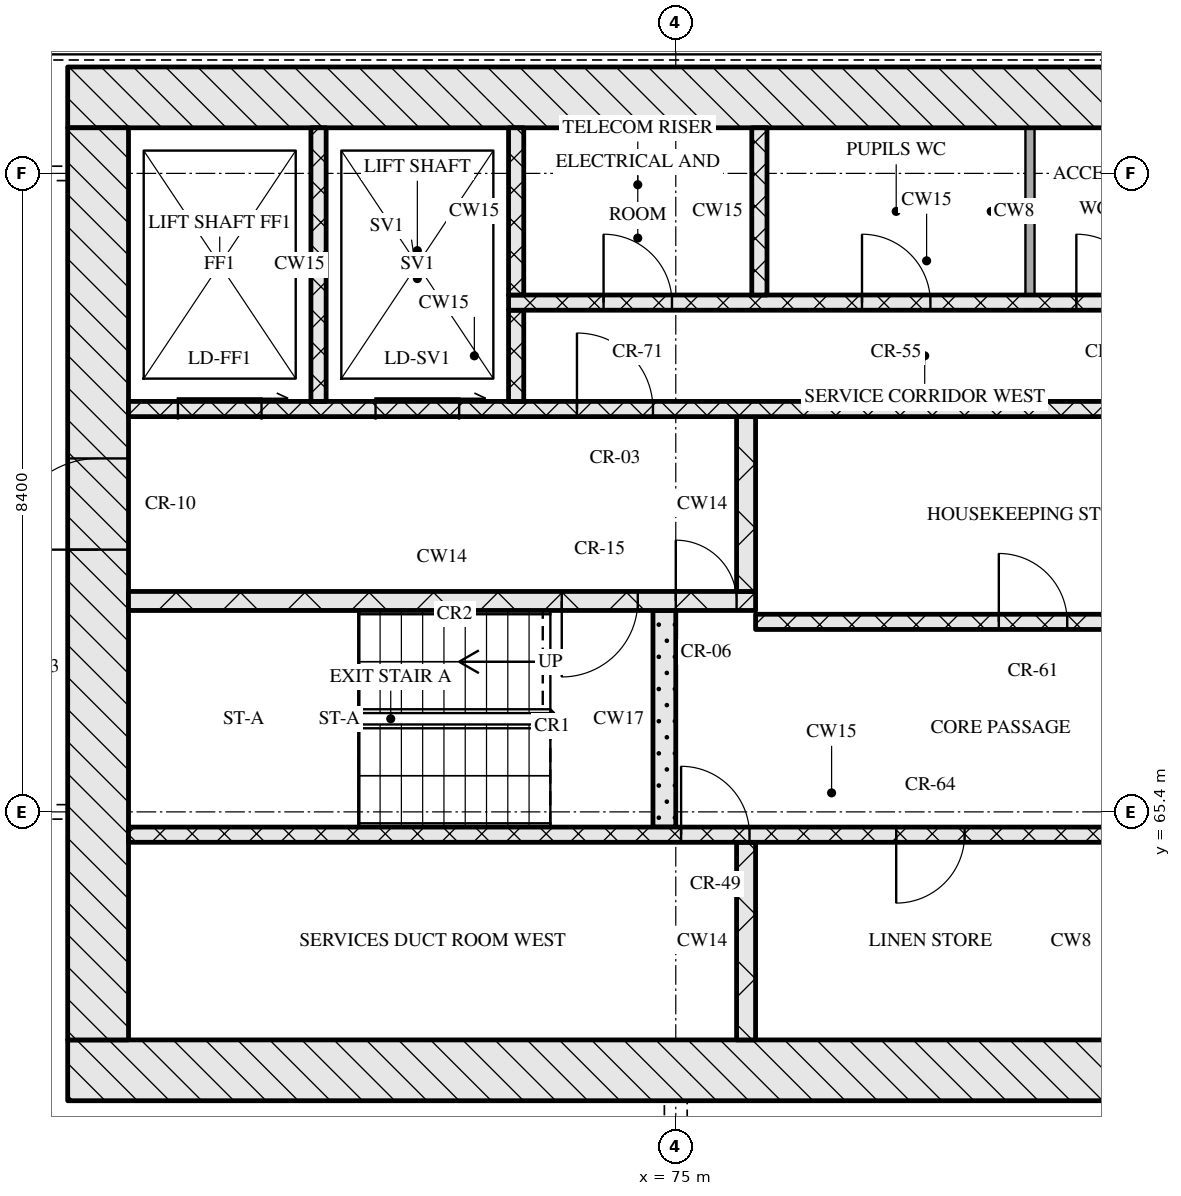
"""IFC4 building model, lengths in metres.
Left out: names, types, materials, properties, quantities, classifications, styles, units other than length and angle.
Written with IfcOpenShell. Run it as: python <this file> out.ifc"""

import sys

from ifc_helpers import new_model, si_unit, direction, frame, frame_2d, origin, place, context, subcontext, project, spatial, rectangle, extrude, element, fill, save


model = new_model("IFC4")
c1 = context("Model", 3, precision=1e-05, world=origin(), true_north=direction((0.0, 1.0)))
c2 = subcontext(c1, "Body", "Model", "MODEL_VIEW")
j1 = project(units=[si_unit("LENGTHUNIT", "METRE"), si_unit("PLANEANGLEUNIT", "RADIAN")], contexts=[c1])
p1 = place(None, origin())
s1 = spatial("IfcSite", under=j1, at=p1, CompositionType="ELEMENT")
p2 = place(p1, origin())
s2 = spatial("IfcBuilding", under=s1, at=p2, CompositionType="ELEMENT")
p3 = place(p2, frame((0.0, 0.0, 158.25)))
s3 = spatial("IfcBuildingStorey", under=s2, at=p3, CompositionType="ELEMENT", Elevation=158.25)
p4 = place(p3, frame((67.0, 62.0, 0.0), z_axis=(0.0, 0.0, 1.0), x_axis=(1.0, 0.0, 0.0)))
e1 = element("IfcWall", 1, at=p4, inside=s3, PredefinedType="SOLIDWALL", context=c2, shape_type="SweptSolid", body=[
    extrude(rectangle(XDim=41.2, YDim=0.8, at=frame_2d((20.6, 0.0))), origin(), (0.0, 0.0, 1.0), 3.32),
])
p5 = place(p4, frame((20.95, 0.0, 0.0)))
e2 = element("IfcOpeningElement", 2, at=p5, cuts=e1, PredefinedType="OPENING", context=c2, shape_type="SweptSolid", body=[
    extrude(rectangle(XDim=1.8, YDim=2.1, at=frame_2d((0.9, 1.05))), frame((0.0, 0.41, 0.0), z_axis=(0.0, -1.0, 0.0), x_axis=(1.0, 0.0, 0.0)), (0.0, 0.0, 1.0), 0.82),
])
p6 = place(p3, frame((67.0, 74.8, 0.0), z_axis=(0.0, 0.0, 1.0), x_axis=(1.0, 0.0, 0.0)))
e3 = element("IfcWall", 3, at=p6, inside=s3, PredefinedType="SOLIDWALL", context=c2, shape_type="SweptSolid", body=[
    extrude(rectangle(XDim=41.2, YDim=0.8, at=frame_2d((20.6, 0.0))), origin(), (0.0, 0.0, 1.0), 3.32),
])
p7 = place(p3, frame((67.4, 62.4, 0.0), z_axis=(0.0, 0.0, 1.0), x_axis=(0.0, 1.0, 0.0)))
e4 = element("IfcWall", 4, at=p7, inside=s3, PredefinedType="SOLIDWALL", context=c2, shape_type="SweptSolid", body=[
    extrude(rectangle(XDim=12.0, YDim=0.8, at=frame_2d((6.0, 0.0))), origin(), (0.0, 0.0, 1.0), 3.32),
])
p8 = place(p7, frame((6.45, 0.0, 0.0)))
e5 = element("IfcOpeningElement", 5, at=p8, cuts=e4, PredefinedType="OPENING", context=c2, shape_type="SweptSolid", body=[
    extrude(rectangle(XDim=1.2, YDim=2.1, at=frame_2d((0.6, 1.05))), frame((0.0, 0.41, 0.0), z_axis=(0.0, -1.0, 0.0), x_axis=(1.0, 0.0, 0.0)), (0.0, 0.0, 1.0), 0.82),
])
p9 = place(p3, frame((75.925, 62.4, 0.0), z_axis=(0.0, 0.0, 1.0), x_axis=(0.0, 1.0, 0.0)))
e6 = element("IfcWall", 6, at=p9, inside=s3, PredefinedType="SOLIDWALL", context=c2, shape_type="SweptSolid", body=[
    extrude(rectangle(XDim=2.6, YDim=0.25, at=frame_2d((1.3, 0.0))), origin(), (0.0, 0.0, 1.0), 3.32),
])
p10 = place(p3, frame((67.8, 65.1, 0.0), z_axis=(0.0, 0.0, 1.0), x_axis=(1.0, 0.0, 0.0)))
e7 = element("IfcWall", 7, at=p10, inside=s3, PredefinedType="SOLIDWALL", context=c2, shape_type="SweptSolid", body=[
    extrude(rectangle(XDim=18.5, YDim=0.2, at=frame_2d((9.25, 0.0))), origin(), (0.0, 0.0, 1.0), 3.32),
])
p11 = place(p10, frame((7.27, 0.0, 0.0)))
e8 = element("IfcOpeningElement", 8, at=p11, cuts=e7, PredefinedType="OPENING", context=c2, shape_type="SweptSolid", body=[
    extrude(rectangle(XDim=0.9, YDim=2.1, at=frame_2d((0.45, 1.05))), frame((0.0, 0.11, 0.0), z_axis=(0.0, -1.0, 0.0), x_axis=(1.0, 0.0, 0.0)), (0.0, 0.0, 1.0), 0.22),
])
p12 = place(p10, frame((10.1, 0.0, 0.0)))
e9 = element("IfcOpeningElement", 9, at=p12, cuts=e7, PredefinedType="OPENING", context=c2, shape_type="SweptSolid", body=[
    extrude(rectangle(XDim=0.9, YDim=2.1, at=frame_2d((0.45, 1.05))), frame((0.0, 0.11, 0.0), z_axis=(0.0, -1.0, 0.0), x_axis=(1.0, 0.0, 0.0)), (0.0, 0.0, 1.0), 0.22),
])
p13 = place(p10, frame((13.81, 0.0, 0.0)))
e10 = element("IfcOpeningElement", 10, at=p13, cuts=e7, PredefinedType="OPENING", context=c2, shape_type="SweptSolid", body=[
    extrude(rectangle(XDim=0.9, YDim=2.1, at=frame_2d((0.45, 1.05))), frame((0.0, 0.11, 0.0), z_axis=(0.0, -1.0, 0.0), x_axis=(1.0, 0.0, 0.0)), (0.0, 0.0, 1.0), 0.22),
])
p14 = place(p10, frame((16.7, 0.0, 0.0)))
e11 = element("IfcOpeningElement", 11, at=p14, cuts=e7, PredefinedType="OPENING", context=c2, shape_type="SweptSolid", body=[
    extrude(rectangle(XDim=0.9, YDim=2.1, at=frame_2d((0.45, 1.05))), frame((0.0, 0.11, 0.0), z_axis=(0.0, -1.0, 0.0), x_axis=(1.0, 0.0, 0.0)), (0.0, 0.0, 1.0), 0.22),
])
p15 = place(p3, frame((74.85, 65.2, 0.0), z_axis=(0.0, 0.0, 1.0), x_axis=(0.0, 1.0, 0.0)))
e12 = element("IfcWall", 12, at=p15, inside=s3, PredefinedType="SOLIDWALL", context=c2, shape_type="SweptSolid", body=[
    extrude(rectangle(XDim=2.85, YDim=0.3, at=frame_2d((1.425, 0.0))), origin(), (0.0, 0.0, 1.0), 3.32),
])
p16 = place(p3, frame((76.05, 67.9, 0.0), z_axis=(0.0, 0.0, 1.0), x_axis=(1.0, 0.0, 0.0)))
e13 = element("IfcWall", 13, at=p16, inside=s3, PredefinedType="SOLIDWALL", context=c2, shape_type="SweptSolid", body=[
    extrude(rectangle(XDim=23.1, YDim=0.2, at=frame_2d((11.55, 0.0))), origin(), (0.0, 0.0, 1.0), 3.32),
])
p17 = place(p16, frame((3.2, 0.0, 0.0)))
e14 = element("IfcOpeningElement", 14, at=p17, cuts=e13, PredefinedType="OPENING", context=c2, shape_type="SweptSolid", body=[
    extrude(rectangle(XDim=0.9, YDim=2.1, at=frame_2d((0.45, 1.05))), frame((0.0, 0.11, 0.0), z_axis=(0.0, -1.0, 0.0), x_axis=(1.0, 0.0, 0.0)), (0.0, 0.0, 1.0), 0.22),
])
p18 = place(p16, frame((9.7, 0.0, 0.0)))
e15 = element("IfcOpeningElement", 15, at=p18, cuts=e13, PredefinedType="OPENING", context=c2, shape_type="SweptSolid", body=[
    extrude(rectangle(XDim=0.9, YDim=2.1, at=frame_2d((0.45, 1.05))), frame((0.0, 0.11, 0.0), z_axis=(0.0, -1.0, 0.0), x_axis=(1.0, 0.0, 0.0)), (0.0, 0.0, 1.0), 0.22),
])
p19 = place(p16, frame((13.55, 0.0, 0.0)))
e16 = element("IfcOpeningElement", 16, at=p19, cuts=e13, PredefinedType="OPENING", context=c2, shape_type="SweptSolid", body=[
    extrude(rectangle(XDim=1.0, YDim=2.1, at=frame_2d((0.5, 1.05))), frame((0.0, 0.11, 0.0), z_axis=(0.0, -1.0, 0.0), x_axis=(1.0, 0.0, 0.0)), (0.0, 0.0, 1.0), 0.22),
])
p20 = place(p16, frame((16.2, 0.0, 0.0)))
e17 = element("IfcOpeningElement", 17, at=p20, cuts=e13, PredefinedType="OPENING", context=c2, shape_type="SweptSolid", body=[
    extrude(rectangle(XDim=1.1, YDim=2.1, at=frame_2d((0.55, 1.05))), frame((0.0, 0.11, 0.0), z_axis=(0.0, -1.0, 0.0), x_axis=(1.0, 0.0, 0.0)), (0.0, 0.0, 1.0), 0.22),
])
p21 = place(p16, frame((18.7, 0.0, 0.0)))
e18 = element("IfcOpeningElement", 18, at=p21, cuts=e13, PredefinedType="OPENING", context=c2, shape_type="SweptSolid", body=[
    extrude(rectangle(XDim=1.1, YDim=2.1, at=frame_2d((0.55, 1.05))), frame((0.0, 0.11, 0.0), z_axis=(0.0, -1.0, 0.0), x_axis=(1.0, 0.0, 0.0)), (0.0, 0.0, 1.0), 0.22),
])
p22 = place(p16, frame((21.2, 0.0, 0.0)))
e19 = element("IfcOpeningElement", 19, at=p22, cuts=e13, PredefinedType="OPENING", context=c2, shape_type="SweptSolid", body=[
    extrude(rectangle(XDim=1.1, YDim=2.1, at=frame_2d((0.55, 1.05))), frame((0.0, 0.11, 0.0), z_axis=(0.0, -1.0, 0.0), x_axis=(1.0, 0.0, 0.0)), (0.0, 0.0, 1.0), 0.22),
])
p23 = place(p3, frame((67.8, 68.175, 0.0), z_axis=(0.0, 0.0, 1.0), x_axis=(1.0, 0.0, 0.0)))
e20 = element("IfcWall", 20, at=p23, inside=s3, PredefinedType="SOLIDWALL", context=c2, shape_type="SweptSolid", body=[
    extrude(rectangle(XDim=8.25, YDim=0.25, at=frame_2d((4.125, 0.0))), origin(), (0.0, 0.0, 1.0), 3.32),
])
p24 = place(p23, frame((5.7, 0.0, 0.0)))
e21 = element("IfcOpeningElement", 21, at=p24, cuts=e20, PredefinedType="OPENING", context=c2, shape_type="SweptSolid", body=[
    extrude(rectangle(XDim=1.0, YDim=2.1, at=frame_2d((0.5, 1.05))), frame((0.0, 0.135, 0.0), z_axis=(0.0, -1.0, 0.0), x_axis=(1.0, 0.0, 0.0)), (0.0, 0.0, 1.0), 0.27),
])
p25 = place(p23, frame((7.2, 0.0, 0.0)))
e22 = element("IfcOpeningElement", 22, at=p25, cuts=e20, PredefinedType="OPENING", context=c2, shape_type="SweptSolid", body=[
    extrude(rectangle(XDim=0.8, YDim=2.1, at=frame_2d((0.4, 1.05))), frame((0.0, 0.135, 0.0), z_axis=(0.0, -1.0, 0.0), x_axis=(1.0, 0.0, 0.0)), (0.0, 0.0, 1.0), 0.27),
])
p26 = place(p3, frame((75.925, 68.3, 0.0), z_axis=(0.0, 0.0, 1.0), x_axis=(0.0, 1.0, 0.0)))
e23 = element("IfcWall", 23, at=p26, inside=s3, PredefinedType="SOLIDWALL", context=c2, shape_type="SweptSolid", body=[
    extrude(rectangle(XDim=2.3, YDim=0.25, at=frame_2d((1.15, 0.0))), origin(), (0.0, 0.0, 1.0), 3.32),
])
p27 = place(p3, frame((67.8, 70.7, 0.0), z_axis=(0.0, 0.0, 1.0), x_axis=(1.0, 0.0, 0.0)))
e24 = element("IfcWall", 24, at=p27, inside=s3, PredefinedType="SOLIDWALL", context=c2, shape_type="SweptSolid", body=[
    extrude(rectangle(XDim=39.6, YDim=0.2, at=frame_2d((19.8, 0.0))), origin(), (0.0, 0.0, 1.0), 3.32),
])
p28 = place(p27, frame((0.65, 0.0, 0.0)))
e25 = element("IfcOpeningElement", 25, at=p28, cuts=e24, PredefinedType="OPENING", context=c2, shape_type="SweptSolid", body=[
    extrude(rectangle(XDim=1.1, YDim=2.1, at=frame_2d((0.55, 1.05))), frame((0.0, 0.11, 0.0), z_axis=(0.0, -1.0, 0.0), x_axis=(1.0, 0.0, 0.0)), (0.0, 0.0, 1.0), 0.22),
])
p29 = place(p27, frame((3.25, 0.0, 0.0)))
e26 = element("IfcOpeningElement", 26, at=p29, cuts=e24, PredefinedType="OPENING", context=c2, shape_type="SweptSolid", body=[
    extrude(rectangle(XDim=1.1, YDim=2.1, at=frame_2d((0.55, 1.05))), frame((0.0, 0.11, 0.0), z_axis=(0.0, -1.0, 0.0), x_axis=(1.0, 0.0, 0.0)), (0.0, 0.0, 1.0), 0.22),
])
p30 = place(p27, frame((5.9, 0.0, 0.0)))
e27 = element("IfcOpeningElement", 27, at=p30, cuts=e24, PredefinedType="OPENING", context=c2, shape_type="SweptSolid", body=[
    extrude(rectangle(XDim=1.0, YDim=2.1, at=frame_2d((0.5, 1.05))), frame((0.0, 0.11, 0.0), z_axis=(0.0, -1.0, 0.0), x_axis=(1.0, 0.0, 0.0)), (0.0, 0.0, 1.0), 0.22),
])
p31 = place(p27, frame((21.7, 0.0, 0.0)))
e28 = element("IfcOpeningElement", 28, at=p31, cuts=e24, PredefinedType="OPENING", context=c2, shape_type="SweptSolid", body=[
    extrude(rectangle(XDim=1.0, YDim=2.1, at=frame_2d((0.5, 1.05))), frame((0.0, 0.11, 0.0), z_axis=(0.0, -1.0, 0.0), x_axis=(1.0, 0.0, 0.0)), (0.0, 0.0, 1.0), 0.22),
])
p32 = place(p27, frame((32.7, 0.0, 0.0)))
e29 = element("IfcOpeningElement", 29, at=p32, cuts=e24, PredefinedType="OPENING", context=c2, shape_type="SweptSolid", body=[
    extrude(rectangle(XDim=1.0, YDim=2.1, at=frame_2d((0.5, 1.05))), frame((0.0, 0.11, 0.0), z_axis=(0.0, -1.0, 0.0), x_axis=(1.0, 0.0, 0.0)), (0.0, 0.0, 1.0), 0.22),
])
p33 = place(p27, frame((35.25, 0.0, 0.0)))
e30 = element("IfcOpeningElement", 30, at=p33, cuts=e24, PredefinedType="OPENING", context=c2, shape_type="SweptSolid", body=[
    extrude(rectangle(XDim=1.1, YDim=2.1, at=frame_2d((0.55, 1.05))), frame((0.0, 0.11, 0.0), z_axis=(0.0, -1.0, 0.0), x_axis=(1.0, 0.0, 0.0)), (0.0, 0.0, 1.0), 0.22),
])
p34 = place(p27, frame((37.85, 0.0, 0.0)))
e31 = element("IfcOpeningElement", 31, at=p34, cuts=e24, PredefinedType="OPENING", context=c2, shape_type="SweptSolid", body=[
    extrude(rectangle(XDim=1.1, YDim=2.1, at=frame_2d((0.55, 1.05))), frame((0.0, 0.11, 0.0), z_axis=(0.0, -1.0, 0.0), x_axis=(1.0, 0.0, 0.0)), (0.0, 0.0, 1.0), 0.22),
])
p35 = place(p3, frame((70.3, 70.8, 0.0), z_axis=(0.0, 0.0, 1.0), x_axis=(0.0, 1.0, 0.0)))
e32 = element("IfcWall", 32, at=p35, inside=s3, PredefinedType="SOLIDWALL", context=c2, shape_type="SweptSolid", body=[
    extrude(rectangle(XDim=3.6, YDim=0.2, at=frame_2d((1.8, 0.0))), origin(), (0.0, 0.0, 1.0), 3.32),
])
p36 = place(p3, frame((72.9, 70.8, 0.0), z_axis=(0.0, 0.0, 1.0), x_axis=(0.0, 1.0, 0.0)))
e33 = element("IfcWall", 33, at=p36, inside=s3, PredefinedType="SOLIDWALL", context=c2, shape_type="SweptSolid", body=[
    extrude(rectangle(XDim=1.2, YDim=0.2, at=frame_2d((0.6, 0.0))), origin(), (0.0, 0.0, 1.0), 3.32),
])
p37 = place(p3, frame((72.8, 72.1, 0.0), z_axis=(0.0, 0.0, 1.0), x_axis=(1.0, 0.0, 0.0)))
e34 = element("IfcWall", 34, at=p37, inside=s3, PredefinedType="SOLIDWALL", context=c2, shape_type="SweptSolid", body=[
    extrude(rectangle(XDim=11.0, YDim=0.2, at=frame_2d((5.5, 0.0))), origin(), (0.0, 0.0, 1.0), 3.32),
])
p38 = place(p37, frame((1.25, 0.0, 0.0)))
e35 = element("IfcOpeningElement", 35, at=p38, cuts=e34, PredefinedType="OPENING", context=c2, shape_type="SweptSolid", body=[
    extrude(rectangle(XDim=0.9, YDim=2.1, at=frame_2d((0.45, 1.05))), frame((0.0, 0.11, 0.0), z_axis=(0.0, -1.0, 0.0), x_axis=(1.0, 0.0, 0.0)), (0.0, 0.0, 1.0), 0.22),
])
p39 = place(p37, frame((4.65, 0.0, 0.0)))
e36 = element("IfcOpeningElement", 36, at=p39, cuts=e34, PredefinedType="OPENING", context=c2, shape_type="SweptSolid", body=[
    extrude(rectangle(XDim=0.9, YDim=2.1, at=frame_2d((0.45, 1.05))), frame((0.0, 0.11, 0.0), z_axis=(0.0, -1.0, 0.0), x_axis=(1.0, 0.0, 0.0)), (0.0, 0.0, 1.0), 0.22),
])
p40 = place(p37, frame((7.47, 0.0, 0.0)))
e37 = element("IfcOpeningElement", 37, at=p40, cuts=e34, PredefinedType="OPENING", context=c2, shape_type="SweptSolid", body=[
    extrude(rectangle(XDim=0.9, YDim=2.1, at=frame_2d((0.45, 1.05))), frame((0.0, 0.11, 0.0), z_axis=(0.0, -1.0, 0.0), x_axis=(1.0, 0.0, 0.0)), (0.0, 0.0, 1.0), 0.22),
])
p41 = place(p37, frame((9.445, 0.0, 0.0)))
e38 = element("IfcOpeningElement", 38, at=p41, cuts=e34, PredefinedType="OPENING", context=c2, shape_type="SweptSolid", body=[
    extrude(rectangle(XDim=0.9, YDim=2.1, at=frame_2d((0.45, 1.05))), frame((0.0, 0.11, 0.0), z_axis=(0.0, -1.0, 0.0), x_axis=(1.0, 0.0, 0.0)), (0.0, 0.0, 1.0), 0.22),
])
for number, where, z_axis, x_axis in (
    (39, (72.9, 72.2, 0.0), (0.0, 0.0, 1.0), (0.0, 1.0, 0.0)),
    (40, (76.1, 72.2, 0.0), (0.0, 0.0, 1.0), (0.0, 1.0, 0.0)),
):
    element("IfcWall", number, at=place(p3, frame(where, z_axis=z_axis, x_axis=x_axis)), inside=s3, PredefinedType="SOLIDWALL", context=c2, shape_type="SweptSolid", body=[
        extrude(rectangle(XDim=2.2, YDim=0.2, at=frame_2d((1.1, 0.0))), origin(), (0.0, 0.0, 1.0), 3.32),
    ])
p42 = place(p3, frame((79.66, 72.2, 0.0), z_axis=(0.0, 0.0, 1.0), x_axis=(0.0, 1.0, 0.0)))
e41 = element("IfcWall", 41, at=p42, inside=s3, PredefinedType="PARTITIONING", context=c2, shape_type="SweptSolid", body=[
    extrude(rectangle(XDim=2.2, YDim=0.12, at=frame_2d((1.1, 0.0))), origin(), (0.0, 0.0, 1.0), 3.32),
])
p43 = place(p11, origin())
e42 = element("IfcDoor", 42, at=p43, inside=s3, OperationType="SINGLE_SWING_LEFT", PredefinedType="DOOR", context=c2, shape_type="SweptSolid", body=[
    extrude(rectangle(XDim=0.9, YDim=2.1, at=frame_2d((0.45, 1.05))), frame((0.0, 0.025, 0.0), z_axis=(0.0, -1.0, 0.0), x_axis=(1.0, 0.0, 0.0)), (0.0, 0.0, 1.0), 0.05),
])
fill(e8, e42)
p44 = place(p12, origin())
e43 = element("IfcDoor", 43, at=p44, inside=s3, OperationType="SINGLE_SWING_RIGHT", PredefinedType="DOOR", context=c2, shape_type="SweptSolid", body=[
    extrude(rectangle(XDim=0.9, YDim=2.1, at=frame_2d((0.45, 1.05))), frame((0.0, 0.025, 0.0), z_axis=(0.0, -1.0, 0.0), x_axis=(1.0, 0.0, 0.0)), (0.0, 0.0, 1.0), 0.05),
])
fill(e9, e43)
p45 = place(p17, origin())
e44 = element("IfcDoor", 44, at=p45, inside=s3, OperationType="SINGLE_SWING_LEFT", PredefinedType="DOOR", context=c2, shape_type="SweptSolid", body=[
    extrude(rectangle(XDim=0.9, YDim=2.1, at=frame_2d((0.45, 1.05))), frame((0.0, 0.025, 0.0), z_axis=(0.0, -1.0, 0.0), x_axis=(1.0, 0.0, 0.0)), (0.0, 0.0, 1.0), 0.05),
])
fill(e14, e44)
p46 = place(p24, origin())
e45 = element("IfcDoor", 45, at=p46, inside=s3, OperationType="SINGLE_SWING_RIGHT", PredefinedType="DOOR", context=c2, shape_type="SweptSolid", body=[
    extrude(rectangle(XDim=1.0, YDim=2.1, at=frame_2d((0.5, 1.05))), frame((0.0, 0.025, 0.0), z_axis=(0.0, -1.0, 0.0), x_axis=(1.0, 0.0, 0.0)), (0.0, 0.0, 1.0), 0.05),
])
fill(e21, e45)
p47 = place(p25, origin())
e46 = element("IfcDoor", 46, at=p47, inside=s3, OperationType="SINGLE_SWING_LEFT", PredefinedType="DOOR", context=c2, shape_type="SweptSolid", body=[
    extrude(rectangle(XDim=0.8, YDim=2.1, at=frame_2d((0.4, 1.05))), frame((0.0, 0.025, 0.0), z_axis=(0.0, -1.0, 0.0), x_axis=(1.0, 0.0, 0.0)), (0.0, 0.0, 1.0), 0.05),
])
fill(e22, e46)
p48 = place(p8, origin())
e47 = element("IfcDoor", 47, at=p48, inside=s3, OperationType="SINGLE_SWING_LEFT", PredefinedType="DOOR", context=c2, shape_type="SweptSolid", body=[
    extrude(rectangle(XDim=1.2, YDim=2.1, at=frame_2d((0.6, 1.05))), frame((0.0, 0.025, 0.0), z_axis=(0.0, -1.0, 0.0), x_axis=(1.0, 0.0, 0.0)), (0.0, 0.0, 1.0), 0.05),
])
fill(e5, e47)
p49 = place(p28, origin())
e48 = element("IfcDoor", 48, at=p49, inside=s3, OperationType="SLIDING_TO_RIGHT", PredefinedType="DOOR", context=c2, shape_type="SweptSolid", body=[
    extrude(rectangle(XDim=1.1, YDim=2.1, at=frame_2d((0.55, 1.05))), frame((0.0, 0.025, 0.0), z_axis=(0.0, -1.0, 0.0), x_axis=(1.0, 0.0, 0.0)), (0.0, 0.0, 1.0), 0.05),
])
fill(e25, e48)
p50 = place(p29, origin())
e49 = element("IfcDoor", 49, at=p50, inside=s3, OperationType="SLIDING_TO_RIGHT", PredefinedType="DOOR", context=c2, shape_type="SweptSolid", body=[
    extrude(rectangle(XDim=1.1, YDim=2.1, at=frame_2d((0.55, 1.05))), frame((0.0, 0.025, 0.0), z_axis=(0.0, -1.0, 0.0), x_axis=(1.0, 0.0, 0.0)), (0.0, 0.0, 1.0), 0.05),
])
fill(e26, e49)
p51 = place(p30, origin())
e50 = element("IfcDoor", 50, at=p51, inside=s3, OperationType="SINGLE_SWING_LEFT", PredefinedType="DOOR", context=c2, shape_type="SweptSolid", body=[
    extrude(rectangle(XDim=1.0, YDim=2.1, at=frame_2d((0.5, 1.05))), frame((0.0, 0.025, 0.0), z_axis=(0.0, -1.0, 0.0), x_axis=(1.0, 0.0, 0.0)), (0.0, 0.0, 1.0), 0.05),
])
fill(e27, e50)
p52 = place(p38, origin())
e51 = element("IfcDoor", 51, at=p52, inside=s3, OperationType="SINGLE_SWING_LEFT", PredefinedType="DOOR", context=c2, shape_type="SweptSolid", body=[
    extrude(rectangle(XDim=0.9, YDim=2.1, at=frame_2d((0.45, 1.05))), frame((0.0, 0.025, 0.0), z_axis=(0.0, -1.0, 0.0), x_axis=(1.0, 0.0, 0.0)), (0.0, 0.0, 1.0), 0.05),
])
fill(e35, e51)
p53 = place(p39, origin())
e52 = element("IfcDoor", 52, at=p53, inside=s3, OperationType="SINGLE_SWING_LEFT", PredefinedType="DOOR", context=c2, shape_type="SweptSolid", body=[
    extrude(rectangle(XDim=0.9, YDim=2.1, at=frame_2d((0.45, 1.05))), frame((0.0, 0.025, 0.0), z_axis=(0.0, -1.0, 0.0), x_axis=(1.0, 0.0, 0.0)), (0.0, 0.0, 1.0), 0.05),
])
fill(e36, e52)
p54 = place(p40, origin())
e53 = element("IfcDoor", 53, at=p54, inside=s3, OperationType="SINGLE_SWING_LEFT", PredefinedType="DOOR", context=c2, shape_type="SweptSolid", body=[
    extrude(rectangle(XDim=0.9, YDim=2.1, at=frame_2d((0.45, 1.05))), frame((0.0, 0.025, 0.0), z_axis=(0.0, -1.0, 0.0), x_axis=(1.0, 0.0, 0.0)), (0.0, 0.0, 1.0), 0.05),
])
fill(e37, e53)
save(model, sys.argv[1])
